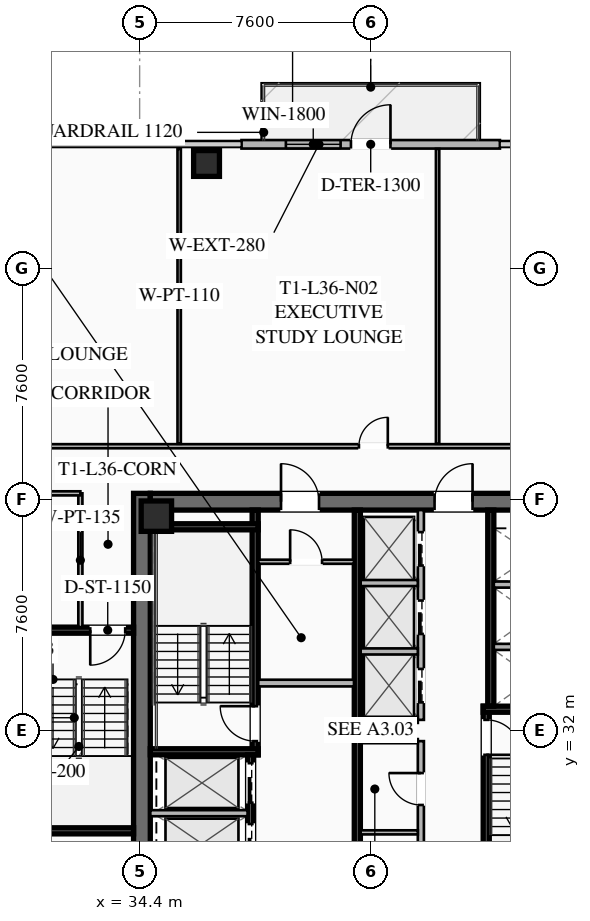
"""IFC4 building model, lengths in metres.
Left out: names, types, materials, properties, quantities, classifications, styles, units other than length and angle.
Written with IfcOpenShell. Run it as: python <this file> out.ifc"""

import sys

from ifc_helpers import new_model, si_unit, direction, frame, frame_2d, origin, origin_2d, place, context, subcontext, project, spatial, rectangle, hollow_rectangle, extrude, element, fill, save


model = new_model("IFC4")
c1 = context("Model", 3, precision=1e-05, world=origin(), true_north=direction((0.0, 1.0)))
c2 = subcontext(c1, "Body", "Model", "MODEL_VIEW")
j1 = project(units=[si_unit("LENGTHUNIT", "METRE"), si_unit("PLANEANGLEUNIT", "RADIAN")], contexts=[c1])
p1 = place(None, origin())
s1 = spatial("IfcSite", under=j1, at=p1, CompositionType="ELEMENT")
p2 = place(p1, origin())
s2 = spatial("IfcBuilding", under=s1, at=p2, CompositionType="ELEMENT")
p3 = place(p2, frame((0.0, 0.0, 135.7)))
s3 = spatial("IfcBuildingStorey", under=s2, at=p3, CompositionType="ELEMENT", Elevation=135.7)
p4 = place(p3, frame((34.475, 24.2, 0.0), z_axis=(0.0, 0.0, 1.0), x_axis=(0.0, 1.0, 0.0)))
e1 = element("IfcWall", 1, at=p4, inside=s3, PredefinedType="SHEAR", context=c2, shape_type="SweptSolid", body=[
    extrude(rectangle(XDim=15.6, YDim=0.55, at=frame_2d((7.8, 0.0))), origin(), (0.0, 0.0, 1.0), 3.55),
])
p5 = place(p3, frame((34.75, 39.525, 0.0), z_axis=(0.0, 0.0, 1.0), x_axis=(1.0, 0.0, 0.0)))
e2 = element("IfcWall", 2, at=p5, inside=s3, PredefinedType="SHEAR", context=c2, shape_type="SweptSolid", body=[
    extrude(rectangle(XDim=14.5, YDim=0.55, at=frame_2d((7.25, 0.0))), origin(), (0.0, 0.0, 1.0), 3.55),
])
p6 = place(p5, frame((4.3, 0.0, 0.0)))
e3 = element("IfcOpeningElement", 3, at=p6, cuts=e2, PredefinedType="OPENING", context=c2, shape_type="SweptSolid", body=[
    extrude(rectangle(XDim=1.25, YDim=2.25, at=frame_2d((0.625, 1.125))), frame((0.0, 0.285, 0.0), z_axis=(0.0, -1.0, 0.0), x_axis=(1.0, 0.0, 0.0)), (0.0, 0.0, 1.0), 0.57),
])
p7 = place(p5, frame((9.35, 0.0, 0.0)))
e4 = element("IfcOpeningElement", 4, at=p7, cuts=e2, PredefinedType="OPENING", context=c2, shape_type="SweptSolid", body=[
    extrude(rectangle(XDim=1.25, YDim=2.25, at=frame_2d((0.625, 1.125))), frame((0.0, 0.285, 0.0), z_axis=(0.0, -1.0, 0.0), x_axis=(1.0, 0.0, 0.0)), (0.0, 0.0, 1.0), 0.57),
])
p8 = place(p3, frame((34.95, 39.05, 0.0), z_axis=(0.0, 0.0, 1.0), x_axis=(1.0, 0.0, 0.0)))
e5 = element("IfcColumn", 5, at=p8, inside=s3, PredefinedType="COLUMN", context=c2, shape_type="SweptSolid", body=[
    extrude(hollow_rectangle(XDim=1.0, YDim=1.0, WallThickness=0.04, at=origin_2d()), origin(), (0.0, 0.0, 1.0), 3.37),
])
p9 = place(p3, frame((36.6, 50.65, 0.0), z_axis=(0.0, 0.0, 1.0), x_axis=(1.0, 0.0, 0.0)))
e6 = element("IfcColumn", 6, at=p9, inside=s3, PredefinedType="COLUMN", context=c2, shape_type="SweptSolid", body=[
    extrude(hollow_rectangle(XDim=0.85, YDim=0.85, WallThickness=0.035, at=origin_2d()), origin(), (0.0, 0.0, 1.0), 3.37),
])
p10 = place(p3, frame((37.75, 51.28, 0.0), z_axis=(0.0, 0.0, 1.0), x_axis=(1.0, 0.0, 0.0)))
e7 = element("IfcWall", 7, at=p10, inside=s3, PredefinedType="SOLIDWALL", context=c2, shape_type="SweptSolid", body=[
    extrude(rectangle(XDim=8.5, YDim=0.28, at=frame_2d((4.25, 0.0))), origin(), (0.0, 0.0, 1.0), 3.37),
])
p11 = place(p10, frame((3.6, 0.0, 0.0)))
e8 = element("IfcOpeningElement", 8, at=p11, cuts=e7, PredefinedType="OPENING", context=c2, shape_type="SweptSolid", body=[
    extrude(rectangle(XDim=1.3, YDim=2.15, at=frame_2d((0.65, 1.075))), frame((0.0, 0.15, 0.0), z_axis=(0.0, -1.0, 0.0), x_axis=(1.0, 0.0, 0.0)), (0.0, 0.0, 1.0), 0.3),
])
p12 = place(p10, frame((1.46, 0.0, 0.85)))
e9 = element("IfcOpeningElement", 9, at=p12, cuts=e7, PredefinedType="OPENING", context=c2, shape_type="SweptSolid", body=[
    extrude(rectangle(XDim=1.8, YDim=1.92, at=frame_2d((0.9, 0.96))), frame((0.0, 0.15, 0.0), z_axis=(0.0, -1.0, 0.0), x_axis=(1.0, 0.0, 0.0)), (0.0, 0.0, 1.0), 0.3),
])
p13 = place(p3, frame((38.2, 31.2, 0.0), z_axis=(0.0, 0.0, 1.0), x_axis=(0.0, 1.0, 0.0)))
e10 = element("IfcWall", 10, at=p13, inside=s3, PredefinedType="SHEAR", context=c2, shape_type="SweptSolid", body=[
    extrude(rectangle(XDim=8.05, YDim=0.2, at=frame_2d((4.025, 0.0))), origin(), (0.0, 0.0, 1.0), 3.37),
])
p14 = place(p13, frame((0.45, 0.0, 0.0)))
e11 = element("IfcOpeningElement", 11, at=p14, cuts=e10, PredefinedType="OPENING", context=c2, shape_type="SweptSolid", body=[
    extrude(rectangle(XDim=1.15, YDim=2.2, at=frame_2d((0.575, 1.1))), frame((0.0, 0.11, 0.0), z_axis=(0.0, -1.0, 0.0), x_axis=(1.0, 0.0, 0.0)), (0.0, 0.0, 1.0), 0.22),
])
for number, where, z_axis, x_axis in (
    (12, (34.75, 31.3, 0.0), (0.0, 0.0, 1.0), (1.0, 0.0, 0.0)),
    (13, (34.75, 38.7, 0.0), (0.0, 0.0, 1.0), (1.0, 0.0, 0.0)),
):
    element("IfcWall", number, at=place(p3, frame(where, z_axis=z_axis, x_axis=x_axis)), inside=s3, PredefinedType="SHEAR", context=c2, shape_type="SweptSolid", body=[
        extrude(rectangle(XDim=3.55, YDim=0.2, at=frame_2d((1.775, 0.0))), origin(), (0.0, 0.0, 1.0), 3.37),
    ])
p15 = place(p3, frame((45.8, 32.8, 0.0), z_axis=(0.0, 0.0, 1.0), x_axis=(0.0, -1.0, 0.0)))
e14 = element("IfcWall", 14, at=p15, inside=s3, PredefinedType="SHEAR", context=c2, shape_type="SweptSolid", body=[
    extrude(rectangle(XDim=8.05, YDim=0.2, at=frame_2d((4.025, 0.0))), origin(), (0.0, 0.0, 1.0), 3.37),
])
p16 = place(p15, frame((0.45, 0.0, 0.0)))
e15 = element("IfcOpeningElement", 15, at=p16, cuts=e14, PredefinedType="OPENING", context=c2, shape_type="SweptSolid", body=[
    extrude(rectangle(XDim=1.15, YDim=2.2, at=frame_2d((0.575, 1.1))), frame((0.0, 0.11, 0.0), z_axis=(0.0, -1.0, 0.0), x_axis=(1.0, 0.0, 0.0)), (0.0, 0.0, 1.0), 0.22),
])
p17 = place(p3, frame((45.7, 32.7, 0.0), z_axis=(0.0, 0.0, 1.0), x_axis=(1.0, 0.0, 0.0)))
e16 = element("IfcWall", 16, at=p17, inside=s3, PredefinedType="SHEAR", context=c2, shape_type="SweptSolid", body=[
    extrude(rectangle(XDim=3.55, YDim=0.2, at=frame_2d((1.775, 0.0))), origin(), (0.0, 0.0, 1.0), 3.37),
])
p18 = place(p3, frame((41.56, 24.75, 0.0), z_axis=(0.0, 0.0, 1.0), x_axis=(0.0, 1.0, 0.0)))
e17 = element("IfcWall", 17, at=p18, inside=s3, PredefinedType="SHEAR", context=c2, shape_type="SweptSolid", body=[
    extrude(rectangle(XDim=14.5, YDim=0.2, at=frame_2d((7.25, 0.0))), origin(), (0.0, 0.0, 1.0), 3.37),
])
p19 = place(p3, frame((38.3, 33.56, 0.0), z_axis=(0.0, 0.0, 1.0), x_axis=(1.0, 0.0, 0.0)))
e18 = element("IfcWall", 18, at=p19, inside=s3, PredefinedType="SOLIDWALL", context=c2, shape_type="SweptSolid", body=[
    extrude(rectangle(XDim=3.15, YDim=0.22, at=frame_2d((1.575, 0.0))), origin(), (0.0, 0.0, 1.0), 2.723),
])
p20 = place(p3, frame((38.05, 24.75, 0.0), z_axis=(0.0, 0.0, 1.0), x_axis=(0.0, 1.0, 0.0)))
e19 = element("IfcWall", 19, at=p20, inside=s3, PredefinedType="SHEAR", context=c2, shape_type="SweptSolid", body=[
    extrude(rectangle(XDim=6.45, YDim=0.2, at=frame_2d((3.225, 0.0))), origin(), (0.0, 0.0, 1.0), 3.37),
])
p21 = place(p20, frame((4.875, 0.0, 0.0)))
e20 = element("IfcOpeningElement", 20, at=p21, cuts=e19, PredefinedType="OPENING", context=c2, shape_type="SweptSolid", body=[
    extrude(rectangle(XDim=1.3, YDim=2.25, at=frame_2d((0.65, 1.125))), frame((0.0, 0.11, 0.0), z_axis=(0.0, -1.0, 0.0), x_axis=(1.0, 0.0, 0.0)), (0.0, 0.0, 1.0), 0.22),
])
p22 = place(p20, frame((2.875, 0.0, 0.0)))
e21 = element("IfcOpeningElement", 21, at=p22, cuts=e19, PredefinedType="OPENING", context=c2, shape_type="SweptSolid", body=[
    extrude(rectangle(XDim=1.3, YDim=2.25, at=frame_2d((0.65, 1.125))), frame((0.0, 0.11, 0.0), z_axis=(0.0, -1.0, 0.0), x_axis=(1.0, 0.0, 0.0)), (0.0, 0.0, 1.0), 0.22),
])
p23 = place(p20, frame((0.675, 0.0, 0.0)))
e22 = element("IfcOpeningElement", 22, at=p23, cuts=e19, PredefinedType="OPENING", context=c2, shape_type="SweptSolid", body=[
    extrude(rectangle(XDim=1.3, YDim=2.25, at=frame_2d((0.65, 1.125))), frame((0.0, 0.11, 0.0), z_axis=(0.0, -1.0, 0.0), x_axis=(1.0, 0.0, 0.0)), (0.0, 0.0, 1.0), 0.22),
])
p24 = place(p3, frame((34.75, 29.28, 0.0), z_axis=(0.0, 0.0, 1.0), x_axis=(1.0, 0.0, 0.0)))
e23 = element("IfcWall", 23, at=p24, inside=s3, PredefinedType="SOLIDWALL", context=c2, shape_type="SweptSolid", body=[
    extrude(rectangle(XDim=3.2, YDim=0.2, at=frame_2d((1.6, 0.0))), origin(), (0.0, 0.0, 1.0), 3.37),
])
p25 = place(p3, frame((45.95, 39.25, 0.0), z_axis=(0.0, 0.0, 1.0), x_axis=(0.0, -1.0, 0.0)))
e24 = element("IfcWall", 24, at=p25, inside=s3, PredefinedType="SHEAR", context=c2, shape_type="SweptSolid", body=[
    extrude(rectangle(XDim=6.45, YDim=0.2, at=frame_2d((3.225, 0.0))), origin(), (0.0, 0.0, 1.0), 3.37),
])
for number, where, z_axis, x_axis in (
    (25, (46.05, 34.75, 0.0), (0.0, 0.0, 1.0), (1.0, 0.0, 0.0)),
    (26, (46.05, 36.8, 0.0), (0.0, 0.0, 1.0), (1.0, 0.0, 0.0)),
):
    element("IfcWall", number, at=place(p3, frame(where, z_axis=z_axis, x_axis=x_axis)), inside=s3, PredefinedType="SOLIDWALL", context=c2, shape_type="SweptSolid", body=[
        extrude(rectangle(XDim=3.2, YDim=0.2, at=frame_2d((1.6, 0.0))), origin(), (0.0, 0.0, 1.0), 3.37),
    ])
p26 = place(p3, frame((38.3, 37.55, 0.0), z_axis=(0.0, 0.0, 1.0), x_axis=(1.0, 0.0, 0.0)))
e27 = element("IfcWall", 27, at=p26, inside=s3, PredefinedType="PARTITIONING", context=c2, shape_type="SweptSolid", body=[
    extrude(rectangle(XDim=3.15, YDim=0.135, at=frame_2d((1.575, 0.0))), origin(), (0.0, 0.0, 1.0), 2.723),
])
p27 = place(p26, frame((1.05, 0.0, 0.0)))
e28 = element("IfcOpeningElement", 28, at=p27, cuts=e27, PredefinedType="OPENING", context=c2, shape_type="SweptSolid", body=[
    extrude(rectangle(XDim=1.05, YDim=2.2, at=frame_2d((0.525, 1.1))), frame((0.0, 0.077, 0.0), z_axis=(0.0, -1.0, 0.0), x_axis=(1.0, 0.0, 0.0)), (0.0, 0.0, 1.0), 0.155),
])
p28 = place(p3, frame((43.65, 24.75, 0.0), z_axis=(0.0, 0.0, 1.0), x_axis=(0.0, 1.0, 0.0)))
e29 = element("IfcWall", 29, at=p28, inside=s3, PredefinedType="SOLIDWALL", context=c2, shape_type="SweptSolid", body=[
    extrude(rectangle(XDim=6.9, YDim=0.2, at=frame_2d((3.45, 0.0))), origin(), (0.0, 0.0, 1.0), 2.723),
])
p29 = place(p28, frame((0.85, 0.0, 0.0)))
e30 = element("IfcOpeningElement", 30, at=p29, cuts=e29, PredefinedType="OPENING", context=c2, shape_type="SweptSolid", body=[
    extrude(rectangle(XDim=0.95, YDim=2.05, at=frame_2d((0.475, 1.025))), frame((0.0, 0.11, 0.0), z_axis=(0.0, -1.0, 0.0), x_axis=(1.0, 0.0, 0.0)), (0.0, 0.0, 1.0), 0.22),
])
p30 = place(p28, frame((4.8, 0.0, 0.0)))
e31 = element("IfcOpeningElement", 31, at=p30, cuts=e29, PredefinedType="OPENING", context=c2, shape_type="SweptSolid", body=[
    extrude(rectangle(XDim=1.05, YDim=2.2, at=frame_2d((0.525, 1.1))), frame((0.0, 0.11, 0.0), z_axis=(0.0, -1.0, 0.0), x_axis=(1.0, 0.0, 0.0)), (0.0, 0.0, 1.0), 0.22),
])
for number, where, z_axis, x_axis in (
    (32, (41.67, 31.65, 0.0), (0.0, 0.0, 1.0), (1.0, 0.0, 0.0)),
    (33, (41.67, 28.65, 0.0), (0.0, 0.0, 1.0), (1.0, 0.0, 0.0)),
):
    element("IfcWall", number, at=place(p3, frame(where, z_axis=z_axis, x_axis=x_axis)), inside=s3, PredefinedType="PARTITIONING", context=c2, shape_type="SweptSolid", body=[
        extrude(rectangle(XDim=1.88, YDim=0.135, at=frame_2d((0.94, 0.0))), origin(), (0.0, 0.0, 1.0), 2.723),
    ])
p31 = place(p3, frame((43.65, 32.35, 0.0), z_axis=(0.0, 0.0, 1.0), x_axis=(0.0, 1.0, 0.0)))
e34 = element("IfcWall", 34, at=p31, inside=s3, PredefinedType="SOLIDWALL", context=c2, shape_type="SweptSolid", body=[
    extrude(rectangle(XDim=6.9, YDim=0.2, at=frame_2d((3.45, 0.0))), origin(), (0.0, 0.0, 1.0), 3.37),
])
p32 = place(p31, frame((0.575, 0.0, 0.0)))
e35 = element("IfcOpeningElement", 35, at=p32, cuts=e34, PredefinedType="OPENING", context=c2, shape_type="SweptSolid", body=[
    extrude(rectangle(XDim=1.1, YDim=2.2, at=frame_2d((0.55, 1.1))), frame((0.0, 0.11, 0.0), z_axis=(0.0, -1.0, 0.0), x_axis=(1.0, 0.0, 0.0)), (0.0, 0.0, 1.0), 0.22),
])
p33 = place(p31, frame((2.825, 0.0, 0.0)))
e36 = element("IfcOpeningElement", 36, at=p33, cuts=e34, PredefinedType="OPENING", context=c2, shape_type="SweptSolid", body=[
    extrude(rectangle(XDim=1.1, YDim=2.2, at=frame_2d((0.55, 1.1))), frame((0.0, 0.11, 0.0), z_axis=(0.0, -1.0, 0.0), x_axis=(1.0, 0.0, 0.0)), (0.0, 0.0, 1.0), 0.22),
])
p34 = place(p31, frame((5.075, 0.0, 0.0)))
e37 = element("IfcOpeningElement", 37, at=p34, cuts=e34, PredefinedType="OPENING", context=c2, shape_type="SweptSolid", body=[
    extrude(rectangle(XDim=1.1, YDim=2.2, at=frame_2d((0.55, 1.1))), frame((0.0, 0.11, 0.0), z_axis=(0.0, -1.0, 0.0), x_axis=(1.0, 0.0, 0.0)), (0.0, 0.0, 1.0), 0.22),
])
for number, where, z_axis, x_axis in (
    (38, (41.67, 32.35, 0.0), (0.0, 0.0, 1.0), (1.0, 0.0, 0.0)),
    (39, (41.67, 34.6, 0.0), (0.0, 0.0, 1.0), (1.0, 0.0, 0.0)),
    (40, (41.67, 36.85, 0.0), (0.0, 0.0, 1.0), (1.0, 0.0, 0.0)),
):
    element("IfcWall", number, at=place(p3, frame(where, z_axis=z_axis, x_axis=x_axis)), inside=s3, PredefinedType="SOLIDWALL", context=c2, shape_type="SweptSolid", body=[
        extrude(rectangle(XDim=1.88, YDim=0.2, at=frame_2d((0.94, 0.0))), origin(), (0.0, 0.0, 1.0), 3.37),
    ])
p35 = place(p3, frame((34.2, 35.3, 0.0), z_axis=(0.0, 0.0, 1.0), x_axis=(-1.0, 0.0, 0.0)))
e41 = element("IfcWall", 41, at=p35, inside=s3, PredefinedType="SHEAR", context=c2, shape_type="SweptSolid", body=[
    extrude(rectangle(XDim=3.4, YDim=0.2, at=frame_2d((1.7, 0.0))), origin(), (0.0, 0.0, 1.0), 3.37),
])
p36 = place(p35, frame((0.275, 0.0, 0.0)))
e42 = element("IfcOpeningElement", 42, at=p36, cuts=e41, PredefinedType="OPENING", context=c2, shape_type="SweptSolid", body=[
    extrude(rectangle(XDim=1.15, YDim=2.2, at=frame_2d((0.575, 1.1))), frame((0.0, 0.11, 0.0), z_axis=(0.0, -1.0, 0.0), x_axis=(1.0, 0.0, 0.0)), (0.0, 0.0, 1.0), 0.22),
])
p37 = place(p3, frame((30.8, 28.7, 0.0), z_axis=(0.0, 0.0, 1.0), x_axis=(1.0, 0.0, 0.0)))
e43 = element("IfcWall", 43, at=p37, inside=s3, PredefinedType="SHEAR", context=c2, shape_type="SweptSolid", body=[
    extrude(rectangle(XDim=3.4, YDim=0.2, at=frame_2d((1.7, 0.0))), origin(), (0.0, 0.0, 1.0), 3.37),
])
p38 = place(p3, frame((32.45, 35.4, 0.0), z_axis=(0.0, 0.0, 1.0), x_axis=(0.0, 1.0, 0.0)))
e44 = element("IfcWall", 44, at=p38, inside=s3, PredefinedType="PARTITIONING", context=c2, shape_type="SweptSolid", body=[
    extrude(rectangle(XDim=4.4, YDim=0.135, at=frame_2d((2.2, 0.0))), origin(), (0.0, 0.0, 1.0), 2.723),
])
p39 = place(p3, frame((25.45, 41.35, 0.0), z_axis=(0.0, 0.0, 1.0), x_axis=(1.0, 0.0, 0.0)))
e45 = element("IfcWall", 45, at=p39, inside=s3, PredefinedType="PARTITIONING", context=c2, shape_type="SweptSolid", body=[
    extrude(rectangle(XDim=33.1, YDim=0.135, at=frame_2d((16.55, 0.0))), origin(), (0.0, 0.0, 1.0), 2.723),
])
p40 = place(p39, frame((0.3, 0.0, 0.0)))
e46 = element("IfcOpeningElement", 46, at=p40, cuts=e45, PredefinedType="OPENING", context=c2, shape_type="SweptSolid", body=[
    extrude(rectangle(XDim=0.95, YDim=2.05, at=frame_2d((0.475, 1.025))), frame((0.0, 0.077, 0.0), z_axis=(0.0, -1.0, 0.0), x_axis=(1.0, 0.0, 0.0)), (0.0, 0.0, 1.0), 0.155),
])
p41 = place(p39, frame((16.163, 0.0, 0.0)))
e47 = element("IfcOpeningElement", 47, at=p41, cuts=e45, PredefinedType="OPENING", context=c2, shape_type="SweptSolid", body=[
    extrude(rectangle(XDim=0.95, YDim=2.05, at=frame_2d((0.475, 1.025))), frame((0.0, 0.077, 0.0), z_axis=(0.0, -1.0, 0.0), x_axis=(1.0, 0.0, 0.0)), (0.0, 0.0, 1.0), 0.155),
])
p42 = place(p39, frame((31.85, 0.0, 0.0)))
e48 = element("IfcOpeningElement", 48, at=p42, cuts=e45, PredefinedType="OPENING", context=c2, shape_type="SweptSolid", body=[
    extrude(rectangle(XDim=0.95, YDim=2.05, at=frame_2d((0.475, 1.025))), frame((0.0, 0.077, 0.0), z_axis=(0.0, -1.0, 0.0), x_axis=(1.0, 0.0, 0.0)), (0.0, 0.0, 1.0), 0.155),
])
for number, where, z_axis, x_axis in (
    (49, (35.7, 41.43, 0.0), (0.0, 0.0, 1.0), (0.0, 1.0, 0.0)),
    (50, (44.2, 41.43, 0.0), (0.0, 0.0, 1.0), (0.0, 1.0, 0.0)),
):
    element("IfcWall", number, at=place(p3, frame(where, z_axis=z_axis, x_axis=x_axis)), inside=s3, PredefinedType="PARTITIONING", context=c2, shape_type="SweptSolid", body=[
        extrude(rectangle(XDim=9.7, YDim=0.11, at=frame_2d((4.85, 0.0))), origin(), (0.0, 0.0, 1.0), 2.723),
    ])
p43 = place(p3, frame((32.45, 39.8, 0.0), z_axis=(0.0, 0.0, 1.0), x_axis=(-1.0, 0.0, 0.0)))
e51 = element("IfcWall", 51, at=p43, inside=s3, PredefinedType="PARTITIONING", context=c2, shape_type="SweptSolid", body=[
    extrude(rectangle(XDim=9.73, YDim=0.135, at=frame_2d((4.865, 0.0))), origin(), (0.0, 0.0, 1.0), 2.723),
])
p44 = place(p43, frame((4.04, 0.0, 0.0)))
e52 = element("IfcOpeningElement", 52, at=p44, cuts=e51, PredefinedType="OPENING", context=c2, shape_type="SweptSolid", body=[
    extrude(rectangle(XDim=0.95, YDim=2.05, at=frame_2d((0.475, 1.025))), frame((0.0, 0.077, 0.0), z_axis=(0.0, -1.0, 0.0), x_axis=(1.0, 0.0, 0.0)), (0.0, 0.0, 1.0), 0.155),
])
p45 = place(p11, origin())
e53 = element("IfcDoor", 53, at=p45, inside=s3, OperationType="SINGLE_SWING_RIGHT", PredefinedType="DOOR", context=c2, shape_type="SweptSolid", body=[
    extrude(rectangle(XDim=1.3, YDim=2.15, at=frame_2d((0.65, 1.075))), frame((0.0, 0.025, 0.0), z_axis=(0.0, -1.0, 0.0), x_axis=(1.0, 0.0, 0.0)), (0.0, 0.0, 1.0), 0.05),
])
fill(e8, e53)
p46 = place(p12, origin())
e54 = element("IfcWindow", 54, at=p46, inside=s3, PartitioningType="SINGLE_PANEL", PredefinedType="WINDOW", context=c2, shape_type="SweptSolid", body=[
    extrude(rectangle(XDim=1.8, YDim=1.92, at=frame_2d((0.9, 0.96))), frame((0.0, 0.03, 0.0), z_axis=(0.0, -1.0, 0.0), x_axis=(1.0, 0.0, 0.0)), (0.0, 0.0, 1.0), 0.06),
])
fill(e9, e54)
p47 = place(p6, origin())
e55 = element("IfcDoor", 55, at=p47, inside=s3, OperationType="SINGLE_SWING_LEFT", PredefinedType="DOOR", context=c2, shape_type="SweptSolid", body=[
    extrude(rectangle(XDim=1.25, YDim=2.25, at=frame_2d((0.625, 1.125))), frame((0.0, 0.025, 0.0), z_axis=(0.0, -1.0, 0.0), x_axis=(1.0, 0.0, 0.0)), (0.0, 0.0, 1.0), 0.05),
])
fill(e3, e55)
p48 = place(p7, origin())
e56 = element("IfcDoor", 56, at=p48, inside=s3, OperationType="SINGLE_SWING_RIGHT", PredefinedType="DOOR", context=c2, shape_type="SweptSolid", body=[
    extrude(rectangle(XDim=1.25, YDim=2.25, at=frame_2d((0.625, 1.125))), frame((0.0, 0.025, 0.0), z_axis=(0.0, -1.0, 0.0), x_axis=(1.0, 0.0, 0.0)), (0.0, 0.0, 1.0), 0.05),
])
fill(e4, e56)
p49 = place(p14, origin())
e57 = element("IfcDoor", 57, at=p49, inside=s3, OperationType="SINGLE_SWING_RIGHT", PredefinedType="DOOR", context=c2, shape_type="SweptSolid", body=[
    extrude(rectangle(XDim=1.15, YDim=2.2, at=frame_2d((0.575, 1.1))), frame((0.0, 0.025, 0.0), z_axis=(0.0, -1.0, 0.0), x_axis=(1.0, 0.0, 0.0)), (0.0, 0.0, 1.0), 0.05),
])
fill(e11, e57)
p50 = place(p16, origin())
e58 = element("IfcDoor", 58, at=p50, inside=s3, OperationType="SINGLE_SWING_RIGHT", PredefinedType="DOOR", context=c2, shape_type="SweptSolid", body=[
    extrude(rectangle(XDim=1.15, YDim=2.2, at=frame_2d((0.575, 1.1))), frame((0.0, 0.025, 0.0), z_axis=(0.0, -1.0, 0.0), x_axis=(1.0, 0.0, 0.0)), (0.0, 0.0, 1.0), 0.05),
])
fill(e15, e58)
p51 = place(p27, origin())
e59 = element("IfcDoor", 59, at=p51, inside=s3, OperationType="SINGLE_SWING_LEFT", PredefinedType="DOOR", context=c2, shape_type="SweptSolid", body=[
    extrude(rectangle(XDim=1.05, YDim=2.2, at=frame_2d((0.525, 1.1))), frame((0.0, 0.025, 0.0), z_axis=(0.0, -1.0, 0.0), x_axis=(1.0, 0.0, 0.0)), (0.0, 0.0, 1.0), 0.05),
])
fill(e28, e59)
p52 = place(p30, origin())
e60 = element("IfcDoor", 60, at=p52, inside=s3, OperationType="SINGLE_SWING_RIGHT", PredefinedType="DOOR", context=c2, shape_type="SweptSolid", body=[
    extrude(rectangle(XDim=1.05, YDim=2.2, at=frame_2d((0.525, 1.1))), frame((0.0, 0.025, 0.0), z_axis=(0.0, -1.0, 0.0), x_axis=(1.0, 0.0, 0.0)), (0.0, 0.0, 1.0), 0.05),
])
fill(e31, e60)
p53 = place(p36, origin())
e61 = element("IfcDoor", 61, at=p53, inside=s3, OperationType="SINGLE_SWING_RIGHT", PredefinedType="DOOR", context=c2, shape_type="SweptSolid", body=[
    extrude(rectangle(XDim=1.15, YDim=2.2, at=frame_2d((0.575, 1.1))), frame((0.0, 0.025, 0.0), z_axis=(0.0, -1.0, 0.0), x_axis=(1.0, 0.0, 0.0)), (0.0, 0.0, 1.0), 0.05),
])
fill(e42, e61)
p54 = place(p41, origin())
e62 = element("IfcDoor", 62, at=p54, inside=s3, OperationType="SINGLE_SWING_RIGHT", PredefinedType="DOOR", context=c2, shape_type="SweptSolid", body=[
    extrude(rectangle(XDim=0.95, YDim=2.05, at=frame_2d((0.475, 1.025))), frame((0.0, 0.025, 0.0), z_axis=(0.0, -1.0, 0.0), x_axis=(1.0, 0.0, 0.0)), (0.0, 0.0, 1.0), 0.05),
])
fill(e47, e62)
p55 = place(p21, origin())
e63 = element("IfcDoor", 63, at=p55, inside=s3, OperationType="SLIDING_TO_LEFT", PredefinedType="DOOR", context=c2, shape_type="SweptSolid", body=[
    extrude(rectangle(XDim=1.3, YDim=2.25, at=frame_2d((0.65, 1.125))), frame((0.0, 0.025, 0.0), z_axis=(0.0, -1.0, 0.0), x_axis=(1.0, 0.0, 0.0)), (0.0, 0.0, 1.0), 0.05),
])
fill(e20, e63)
p56 = place(p22, origin())
e64 = element("IfcDoor", 64, at=p56, inside=s3, OperationType="SLIDING_TO_LEFT", PredefinedType="DOOR", context=c2, shape_type="SweptSolid", body=[
    extrude(rectangle(XDim=1.3, YDim=2.25, at=frame_2d((0.65, 1.125))), frame((0.0, 0.025, 0.0), z_axis=(0.0, -1.0, 0.0), x_axis=(1.0, 0.0, 0.0)), (0.0, 0.0, 1.0), 0.05),
])
fill(e21, e64)
p57 = place(p32, origin())
e65 = element("IfcDoor", 65, at=p57, inside=s3, OperationType="SLIDING_TO_LEFT", PredefinedType="DOOR", context=c2, shape_type="SweptSolid", body=[
    extrude(rectangle(XDim=1.1, YDim=2.2, at=frame_2d((0.55, 1.1))), frame((0.0, 0.025, 0.0), z_axis=(0.0, -1.0, 0.0), x_axis=(1.0, 0.0, 0.0)), (0.0, 0.0, 1.0), 0.05),
])
fill(e35, e65)
p58 = place(p33, origin())
e66 = element("IfcDoor", 66, at=p58, inside=s3, OperationType="SLIDING_TO_LEFT", PredefinedType="DOOR", context=c2, shape_type="SweptSolid", body=[
    extrude(rectangle(XDim=1.1, YDim=2.2, at=frame_2d((0.55, 1.1))), frame((0.0, 0.025, 0.0), z_axis=(0.0, -1.0, 0.0), x_axis=(1.0, 0.0, 0.0)), (0.0, 0.0, 1.0), 0.05),
])
fill(e36, e66)
p59 = place(p34, origin())
e67 = element("IfcDoor", 67, at=p59, inside=s3, OperationType="SLIDING_TO_LEFT", PredefinedType="DOOR", context=c2, shape_type="SweptSolid", body=[
    extrude(rectangle(XDim=1.1, YDim=2.2, at=frame_2d((0.55, 1.1))), frame((0.0, 0.025, 0.0), z_axis=(0.0, -1.0, 0.0), x_axis=(1.0, 0.0, 0.0)), (0.0, 0.0, 1.0), 0.05),
])
fill(e37, e67)
save(model, sys.argv[1])
